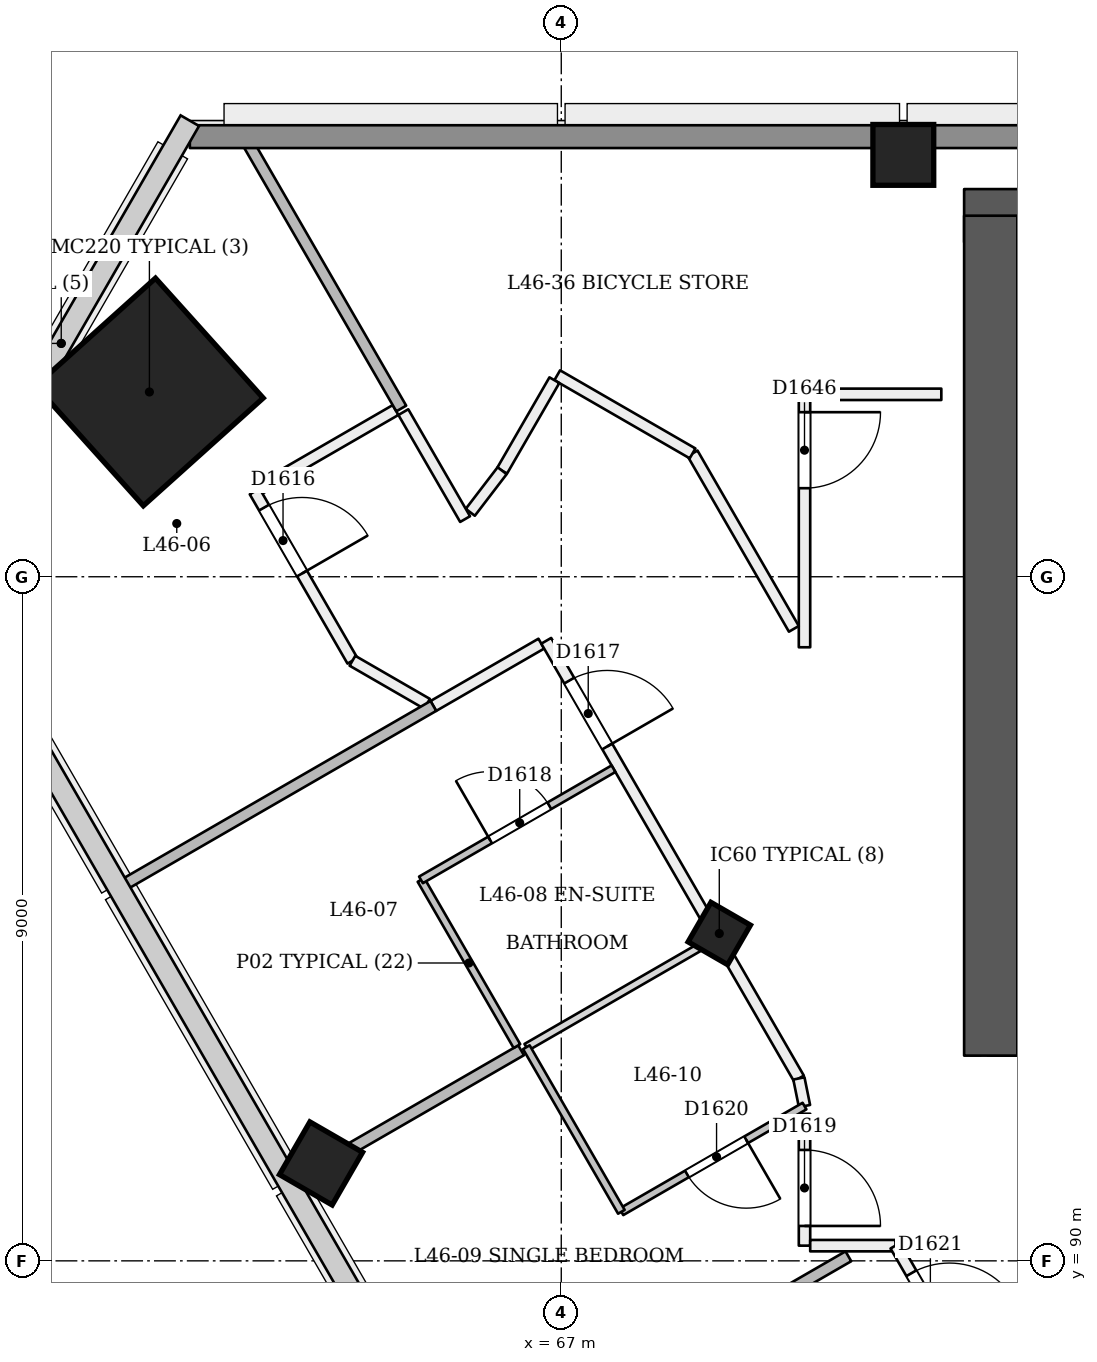
"""IFC4 building model, lengths in metres.
Left out: names, types, materials, properties, quantities, classifications, styles, units other than length and angle.
Written with IfcOpenShell. Run it as: python <this file> out.ifc"""

import sys

from ifc_helpers import new_model, si_unit, direction, frame, frame_2d, origin, origin_2d, place, context, subcontext, project, spatial, rectangle, extrude, element, fill, save


model = new_model("IFC4")
c1 = context("Model", 3, precision=1e-05, world=origin(), true_north=direction((0.0, 1.0)))
c2 = subcontext(c1, "Body", "Model", "MODEL_VIEW")
j1 = project(units=[si_unit("LENGTHUNIT", "METRE"), si_unit("PLANEANGLEUNIT", "RADIAN")], contexts=[c1])
p1 = place(None, origin())
s1 = spatial("IfcSite", under=j1, at=p1, CompositionType="ELEMENT")
p2 = place(p1, origin())
s2 = spatial("IfcBuilding", under=s1, at=p2, CompositionType="ELEMENT")
p3 = place(p2, frame((0.0, 0.0, 178.2)))
s3 = spatial("IfcBuildingStorey", under=s2, at=p3, CompositionType="ELEMENT", Elevation=178.2)
p4 = place(p3, frame((72.65, 93.05, 0.0), z_axis=(0.0, 0.0, 1.0), x_axis=(1.0, 0.0, 0.0)))
e1 = element("IfcWall", 1, at=p4, inside=s3, PredefinedType="SHEAR", context=c2, shape_type="SweptSolid", body=[
    extrude(rectangle(XDim=25.05, YDim=0.7, at=frame_2d((12.525, 0.0))), origin(), (0.0, 0.0, 1.0), 3.6),
])
p5 = place(p4, frame((1.15, 0.0, 0.0)))
e2 = element("IfcOpeningElement", 2, at=p5, cuts=e1, PredefinedType="OPENING", context=c2, shape_type="SweptSolid", body=[
    extrude(rectangle(XDim=1.2, YDim=2.1, at=frame_2d((0.6, 1.05))), frame((0.0, 0.36, 0.0), z_axis=(0.0, -1.0, 0.0), x_axis=(1.0, 0.0, 0.0)), (0.0, 0.0, 1.0), 0.721),
])
p6 = place(p4, frame((3.35, 0.0, 0.0)))
e3 = element("IfcOpeningElement", 3, at=p6, cuts=e1, PredefinedType="OPENING", context=c2, shape_type="SweptSolid", body=[
    extrude(rectangle(XDim=1.2, YDim=2.1, at=frame_2d((0.6, 1.05))), frame((0.0, 0.36, 0.0), z_axis=(0.0, -1.0, 0.0), x_axis=(1.0, 0.0, 0.0)), (0.0, 0.0, 1.0), 0.721),
])
p7 = place(p4, frame((13.35, 0.0, 0.0)))
e4 = element("IfcOpeningElement", 4, at=p7, cuts=e1, PredefinedType="OPENING", context=c2, shape_type="SweptSolid", body=[
    extrude(rectangle(XDim=1.2, YDim=2.1, at=frame_2d((0.6, 1.05))), frame((0.0, 0.36, 0.0), z_axis=(0.0, -1.0, 0.0), x_axis=(1.0, 0.0, 0.0)), (0.0, 0.0, 1.0), 0.721),
])
p8 = place(p4, frame((15.312, 0.0, 0.0)))
e5 = element("IfcOpeningElement", 5, at=p8, cuts=e1, PredefinedType="OPENING", context=c2, shape_type="SweptSolid", body=[
    extrude(rectangle(XDim=1.0, YDim=2.1, at=frame_2d((0.5, 1.05))), frame((0.0, 0.36, 0.0), z_axis=(0.0, -1.0, 0.0), x_axis=(1.0, 0.0, 0.0)), (0.0, 0.0, 1.0), 0.721),
])
p9 = place(p4, frame((18.15, 0.0, 0.0)))
e6 = element("IfcOpeningElement", 6, at=p9, cuts=e1, PredefinedType="OPENING", context=c2, shape_type="SweptSolid", body=[
    extrude(rectangle(XDim=1.0, YDim=2.1, at=frame_2d((0.5, 1.05))), frame((0.0, 0.36, 0.0), z_axis=(0.0, -1.0, 0.0), x_axis=(1.0, 0.0, 0.0)), (0.0, 0.0, 1.0), 0.721),
])
p10 = place(p4, frame((21.05, 0.0, 0.0)))
e7 = element("IfcOpeningElement", 7, at=p10, cuts=e1, PredefinedType="OPENING", context=c2, shape_type="SweptSolid", body=[
    extrude(rectangle(XDim=1.0, YDim=2.1, at=frame_2d((0.5, 1.05))), frame((0.0, 0.36, 0.0), z_axis=(0.0, -1.0, 0.0), x_axis=(1.0, 0.0, 0.0)), (0.0, 0.0, 1.0), 0.721),
])
p11 = place(p4, frame((22.938, 0.0, 0.0)))
e8 = element("IfcOpeningElement", 8, at=p11, cuts=e1, PredefinedType="OPENING", context=c2, shape_type="SweptSolid", body=[
    extrude(rectangle(XDim=1.0, YDim=2.1, at=frame_2d((0.5, 1.05))), frame((0.0, 0.36, 0.0), z_axis=(0.0, -1.0, 0.0), x_axis=(1.0, 0.0, 0.0)), (0.0, 0.0, 1.0), 0.721),
])
p12 = place(p3, frame((97.35, 103.75, 0.0), z_axis=(0.0, 0.0, 1.0), x_axis=(-1.0, 0.0, 0.0)))
e9 = element("IfcWall", 9, at=p12, inside=s3, PredefinedType="SHEAR", context=c2, shape_type="SweptSolid", body=[
    extrude(rectangle(XDim=25.05, YDim=0.7, at=frame_2d((12.525, 0.0))), origin(), (0.0, 0.0, 1.0), 3.6),
])
p13 = place(p3, frame((72.65, 103.75, 0.0), z_axis=(0.0, 0.0, 1.0), x_axis=(0.0, -1.0, 0.0)))
e10 = element("IfcWall", 10, at=p13, inside=s3, PredefinedType="SHEAR", context=c2, shape_type="SweptSolid", body=[
    extrude(rectangle(XDim=11.05, YDim=0.7, at=frame_2d((5.525, 0.0))), origin(), (0.0, 0.0, 1.0), 3.6),
])
p14 = place(p3, frame((69.052, 94.26, -0.018), z_axis=(0.022222852987, 0.038483477124, 0.999012095419), x_axis=(-0.865642058299, -0.49918203825, 0.038485316572)))
e11 = element("IfcColumn", 11, at=p14, inside=s3, PredefinedType="COLUMN", context=c2, shape_type="SweptSolid", body=[
    extrude(rectangle(XDim=0.6, YDim=0.6, at=origin_2d()), origin(), (0.0, 0.0, 1.0), 3.604),
])
p15 = place(p3, frame((61.547, 101.42, 0.0), z_axis=(0.028401796786, 0.009286506348, 0.999553449666), x_axis=(-0.866206321778, 0.499287135176, 0.019974102218)))
e12 = element("IfcColumn", 12, at=p15, inside=s3, PredefinedType="COLUMN", context=c2, shape_type="SweptSolid", body=[
    extrude(rectangle(XDim=2.12, YDim=2.12, at=origin_2d()), origin(), (0.0, 0.0, 1.0), 3.602),
])
p16 = place(p3, frame((71.5, 104.55, 0.0), z_axis=(0.0, 0.0, 1.0), x_axis=(1.0, 0.0, 0.0)))
e13 = element("IfcColumn", 13, at=p16, inside=s3, PredefinedType="COLUMN", context=c2, shape_type="SweptSolid", body=[
    extrude(rectangle(XDim=0.8, YDim=0.8, at=origin_2d()), origin(), (0.0, 0.0, 1.0), 3.6),
])
p17 = place(p3, frame((63.812, 91.234, -0.024), z_axis=(0.02215519141, 0.038415882353, 0.999016199807), x_axis=(-0.865361947816, -0.499673614488, 0.038405445666)))
e14 = element("IfcColumn", 14, at=p17, inside=s3, PredefinedType="COLUMN", context=c2, shape_type="SweptSolid", body=[
    extrude(rectangle(XDim=0.8, YDim=0.8, at=origin_2d()), origin(), (0.0, 0.0, 1.0), 3.604),
])
p18 = place(p3, frame((64.82, 101.193, 0.0), z_axis=(0.0, 0.0, 1.0), x_axis=(-0.865774039155, -0.500435123793, 0.0)))
e15 = element("IfcWall", 15, at=p18, inside=s3, PredefinedType="PARTITIONING", context=c2, shape_type="SweptSolid", body=[
    extrude(rectangle(XDim=2.066, YDim=0.15, at=frame_2d((1.033, 0.0))), origin(), (0.0, 0.0, 1.0), 3.15),
])
p19 = place(p3, frame((62.967, 100.122, 0.0), z_axis=(0.0, 0.0, 1.0), x_axis=(0.499988145349, -0.866032247962, 0.0)))
e16 = element("IfcWall", 16, at=p19, inside=s3, PredefinedType="PARTITIONING", context=c2, shape_type="SweptSolid", body=[
    extrude(rectangle(XDim=2.572, YDim=0.15, at=frame_2d((1.286, 0.0))), origin(), (0.0, 0.0, 1.0), 3.15),
])
p20 = place(p19, frame((0.246, 0.0, 0.0)))
e17 = element("IfcOpeningElement", 17, at=p20, cuts=e16, PredefinedType="OPENING", context=c2, shape_type="SweptSolid", body=[
    extrude(rectangle(XDim=1.0, YDim=2.1, at=frame_2d((0.5, 1.05))), frame((0.0, 0.085, 0.0), z_axis=(0.0, -1.0, 0.0), x_axis=(1.0, 0.0, 0.0)), (0.0, 0.0, 1.0), 0.171),
])
p21 = place(p3, frame((64.252, 97.895, 0.0), z_axis=(0.0, 0.0, 1.0), x_axis=(0.865966686804, -0.500101687005, 0.0)))
e18 = element("IfcWall", 18, at=p21, inside=s3, PredefinedType="PARTITIONING", context=c2, shape_type="SweptSolid", body=[
    extrude(rectangle(XDim=1.133, YDim=0.15, at=frame_2d((0.566, 0.0))), origin(), (0.0, 0.0, 1.0), 3.15),
])
p22 = place(p3, frame((65.317, 97.3, 0.0), z_axis=(0.0, 0.0, 1.0), x_axis=(0.866016967894, 0.500014611105, 0.0)))
e19 = element("IfcWall", 19, at=p22, inside=s3, PredefinedType="PARTITIONING", context=c2, shape_type="SweptSolid", body=[
    extrude(rectangle(XDim=1.64, YDim=0.15, at=frame_2d((0.82, 0.0))), origin(), (0.0, 0.0, 1.0), 3.15),
])
p23 = place(p3, frame((66.802, 98.157, 0.0), z_axis=(0.0, 0.0, 1.0), x_axis=(0.499982058975, -0.866035761792, 0.0)))
e20 = element("IfcWall", 20, at=p23, inside=s3, PredefinedType="PARTITIONING", context=c2, shape_type="SweptSolid", body=[
    extrude(rectangle(XDim=6.648, YDim=0.15, at=frame_2d((3.324, 0.0))), origin(), (0.0, 0.0, 1.0), 2.75),
])
p24 = place(p23, frame((0.605, 0.0, 0.0)))
e21 = element("IfcOpeningElement", 21, at=p24, cuts=e20, PredefinedType="OPENING", context=c2, shape_type="SweptSolid", body=[
    extrude(rectangle(XDim=1.0, YDim=2.1, at=frame_2d((0.5, 1.05))), frame((0.0, 0.085, 0.0), z_axis=(0.0, -1.0, 0.0), x_axis=(1.0, 0.0, 0.0)), (0.0, 0.0, 1.0), 0.171),
])
p25 = place(p3, frame((70.2, 91.935, 0.0), z_axis=(0.0, 0.0, 1.0), x_axis=(0.0, -1.0, 0.0)))
e22 = element("IfcWall", 22, at=p25, inside=s3, PredefinedType="PARTITIONING", context=c2, shape_type="SweptSolid", body=[
    extrude(rectangle(XDim=1.735, YDim=0.15, at=frame_2d((0.868, 0.0))), origin(), (0.0, 0.0, 1.0), 3.15),
])
p26 = place(p25, frame((0.476, 0.0, 0.0)))
e23 = element("IfcOpeningElement", 23, at=p26, cuts=e22, PredefinedType="OPENING", context=c2, shape_type="SweptSolid", body=[
    extrude(rectangle(XDim=1.0, YDim=2.1, at=frame_2d((0.5, 1.05))), frame((0.0, 0.085, 0.0), z_axis=(0.0, -1.0, 0.0), x_axis=(1.0, 0.0, 0.0)), (0.0, 0.0, 1.0), 0.171),
])
p27 = place(p3, frame((70.275, 90.2, 0.0), z_axis=(0.0, 0.0, 1.0), x_axis=(1.0, 0.0, 0.0)))
e24 = element("IfcWall", 24, at=p27, inside=s3, PredefinedType="PARTITIONING", context=c2, shape_type="SweptSolid", body=[
    extrude(rectangle(XDim=1.122, YDim=0.15, at=frame_2d((0.561, 0.0))), origin(), (0.0, 0.0, 1.0), 3.15),
])
p28 = place(p3, frame((70.126, 92.4, 0.0), z_axis=(0.0, 0.0, 1.0), x_axis=(0.198645351923, -0.980071438294, 0.0)))
e25 = element("IfcWall", 25, at=p28, inside=s3, PredefinedType="PARTITIONING", context=c2, shape_type="SweptSolid", body=[
    extrude(rectangle(XDim=0.371, YDim=0.15, at=frame_2d((0.186, 0.0))), origin(), (0.0, 0.0, 1.0), 3.15),
])
p29 = place(p3, frame((71.396, 90.2, 0.0), z_axis=(0.0, 0.0, 1.0), x_axis=(0.500000568002, -0.866025075848, 0.0)))
e26 = element("IfcWall", 26, at=p29, inside=s3, PredefinedType="PARTITIONING", context=c2, shape_type="SweptSolid", body=[
    extrude(rectangle(XDim=27.077, YDim=0.15, at=frame_2d((13.539, 0.0))), origin(), (0.0, 0.0, 1.0), 2.75),
])
p30 = place(p29, frame((0.419, 0.0, 0.0)))
e27 = element("IfcOpeningElement", 27, at=p30, cuts=e26, PredefinedType="OPENING", context=c2, shape_type="SweptSolid", body=[
    extrude(rectangle(XDim=1.0, YDim=2.1, at=frame_2d((0.5, 1.05))), frame((0.0, 0.085, 0.0), z_axis=(0.0, -1.0, 0.0), x_axis=(1.0, 0.0, 0.0)), (0.0, 0.0, 1.0), 0.171),
])
p31 = place(p29, frame((7.091, 0.0, 0.0)))
e28 = element("IfcOpeningElement", 28, at=p31, cuts=e26, PredefinedType="OPENING", context=c2, shape_type="SweptSolid", body=[
    extrude(rectangle(XDim=1.0, YDim=2.1, at=frame_2d((0.5, 1.05))), frame((0.0, 0.085, 0.0), z_axis=(0.0, -1.0, 0.0), x_axis=(1.0, 0.0, 0.0)), (0.0, 0.0, 1.0), 0.171),
])
p32 = place(p29, frame((9.532, 0.0, 0.0)))
e29 = element("IfcOpeningElement", 29, at=p32, cuts=e26, PredefinedType="OPENING", context=c2, shape_type="SweptSolid", body=[
    extrude(rectangle(XDim=1.0, YDim=2.1, at=frame_2d((0.5, 1.05))), frame((0.0, 0.085, 0.0), z_axis=(0.0, -1.0, 0.0), x_axis=(1.0, 0.0, 0.0)), (0.0, 0.0, 1.0), 0.171),
])
p33 = place(p29, frame((16.091, 0.0, 0.0)))
e30 = element("IfcOpeningElement", 30, at=p33, cuts=e26, PredefinedType="OPENING", context=c2, shape_type="SweptSolid", body=[
    extrude(rectangle(XDim=1.0, YDim=2.1, at=frame_2d((0.5, 1.05))), frame((0.0, 0.085, 0.0), z_axis=(0.0, -1.0, 0.0), x_axis=(1.0, 0.0, 0.0)), (0.0, 0.0, 1.0), 0.171),
])
p34 = place(p29, frame((18.416, 0.0, 0.0)))
e31 = element("IfcOpeningElement", 31, at=p34, cuts=e26, PredefinedType="OPENING", context=c2, shape_type="SweptSolid", body=[
    extrude(rectangle(XDim=1.0, YDim=2.1, at=frame_2d((0.5, 1.05))), frame((0.0, 0.085, 0.0), z_axis=(0.0, -1.0, 0.0), x_axis=(1.0, 0.0, 0.0)), (0.0, 0.0, 1.0), 0.171),
])
p35 = place(p29, frame((25.432, 0.0, 0.0)))
e32 = element("IfcOpeningElement", 32, at=p35, cuts=e26, PredefinedType="OPENING", context=c2, shape_type="SweptSolid", body=[
    extrude(rectangle(XDim=1.2, YDim=2.1, at=frame_2d((0.6, 1.05))), frame((0.0, 0.085, 0.0), z_axis=(0.0, -1.0, 0.0), x_axis=(1.0, 0.0, 0.0)), (0.0, 0.0, 1.0), 0.171),
])
p36 = place(p3, frame((72.0, 101.4, 0.0), z_axis=(0.0, 0.0, 1.0), x_axis=(-1.0, 0.0, 0.0)))
e33 = element("IfcWall", 33, at=p36, inside=s3, PredefinedType="PARTITIONING", context=c2, shape_type="SweptSolid", body=[
    extrude(rectangle(XDim=1.725, YDim=0.15, at=frame_2d((0.863, 0.0))), origin(), (0.0, 0.0, 1.0), 3.15),
])
p37 = place(p3, frame((70.2, 101.4, 0.0), z_axis=(0.0, 0.0, 1.0), x_axis=(0.0, -1.0, 0.0)))
e34 = element("IfcWall", 34, at=p37, inside=s3, PredefinedType="PARTITIONING", context=c2, shape_type="SweptSolid", body=[
    extrude(rectangle(XDim=3.328, YDim=0.15, at=frame_2d((1.664, 0.0))), origin(), (0.0, 0.0, 1.0), 3.15),
])
p38 = place(p37, frame((0.235, 0.0, 0.0)))
e35 = element("IfcOpeningElement", 35, at=p38, cuts=e34, PredefinedType="OPENING", context=c2, shape_type="SweptSolid", body=[
    extrude(rectangle(XDim=1.0, YDim=2.1, at=frame_2d((0.5, 1.05))), frame((0.0, 0.085, 0.0), z_axis=(0.0, -1.0, 0.0), x_axis=(1.0, 0.0, 0.0)), (0.0, 0.0, 1.0), 0.171),
])
p39 = place(p3, frame((70.06, 98.315, 0.0), z_axis=(0.0, 0.0, 1.0), x_axis=(-0.500010524421, 0.866019327422, 0.0)))
e36 = element("IfcWall", 36, at=p39, inside=s3, PredefinedType="PARTITIONING", context=c2, shape_type="SweptSolid", body=[
    extrude(rectangle(XDim=2.666, YDim=0.15, at=frame_2d((1.333, 0.0))), origin(), (0.0, 0.0, 1.0), 3.15),
])
p40 = place(p3, frame((68.727, 100.623, 0.0), z_axis=(0.0, 0.0, 1.0), x_axis=(-0.866027366358, 0.499996600708, 0.0)))
e37 = element("IfcWall", 37, at=p40, inside=s3, PredefinedType="PARTITIONING", context=c2, shape_type="SweptSolid", body=[
    extrude(rectangle(XDim=2.056, YDim=0.15, at=frame_2d((1.028, 0.0))), origin(), (0.0, 0.0, 1.0), 3.15),
])
p41 = place(p3, frame((66.909, 101.586, 0.0), z_axis=(0.0, 0.0, 1.0), x_axis=(-0.499958106649, -0.866049589571, 0.0)))
e38 = element("IfcWall", 38, at=p41, inside=s3, PredefinedType="PARTITIONING", context=c2, shape_type="SweptSolid", body=[
    extrude(rectangle(XDim=1.375, YDim=0.15, at=frame_2d((0.688, 0.0))), origin(), (0.0, 0.0, 1.0), 3.15),
])
p42 = place(p3, frame((66.222, 100.395, 0.0), z_axis=(0.0, 0.0, 1.0), x_axis=(-0.607962851569, -0.793965472242, 0.0)))
e39 = element("IfcWall", 39, at=p42, inside=s3, PredefinedType="PARTITIONING", context=c2, shape_type="SweptSolid", body=[
    extrude(rectangle(XDim=0.689, YDim=0.15, at=frame_2d((0.345, 0.0))), origin(), (0.0, 0.0, 1.0), 3.15),
])
p43 = place(p3, frame((65.735, 99.759, 0.0), z_axis=(0.0, 0.0, 1.0), x_axis=(-0.499839503961, 0.866118046389, 0.0)))
e40 = element("IfcWall", 40, at=p43, inside=s3, PredefinedType="PARTITIONING", context=c2, shape_type="SweptSolid", body=[
    extrude(rectangle(XDim=1.625, YDim=0.15, at=frame_2d((0.812, 0.0))), origin(), (0.0, 0.0, 1.0), 3.15),
])
p44 = place(p3, frame((61.242, 94.947, 0.0), z_axis=(0.0, 0.0, 1.0), x_axis=(0.866028339916, 0.499994914436, 0.0)))
e41 = element("IfcWall", 41, at=p44, inside=s3, PredefinedType="PARTITIONING", context=c2, shape_type="SweptSolid", body=[
    extrude(rectangle(XDim=4.706, YDim=0.15, at=frame_2d((2.353, 0.0))), origin(), (0.0, 0.0, 1.0), 2.65),
])
p45 = place(p3, frame((64.895, 101.214, 0.0), z_axis=(0.0, 0.0, 1.0), x_axis=(-0.500025305846, 0.866010792954, 0.0)))
e42 = element("IfcWall", 42, at=p45, inside=s3, PredefinedType="PARTITIONING", context=c2, shape_type="SweptSolid", body=[
    extrude(rectangle(XDim=4.257, YDim=0.15, at=frame_2d((2.128, 0.0))), origin(), (0.0, 0.0, 1.0), 2.65),
])
p46 = place(p3, frame((66.417, 92.825, 0.0), z_axis=(0.0, 0.0, 1.0), x_axis=(-0.499976333282, 0.866039067339, 0.0)))
e43 = element("IfcWall", 43, at=p46, inside=s3, PredefinedType="PARTITIONING", context=c2, shape_type="SweptSolid", body=[
    extrude(rectangle(XDim=2.525, YDim=0.1, at=frame_2d((1.262, 0.0))), origin(), (0.0, 0.0, 1.0), 2.75),
])
p47 = place(p3, frame((65.154, 95.012, 0.0), z_axis=(0.0, 0.0, 1.0), x_axis=(0.866046596414, 0.499963291492, 0.0)))
e44 = element("IfcWall", 44, at=p47, inside=s3, PredefinedType="PARTITIONING", context=c2, shape_type="SweptSolid", body=[
    extrude(rectangle(XDim=2.925, YDim=0.1, at=frame_2d((1.462, 0.0))), origin(), (0.0, 0.0, 1.0), 3.15),
])
p48 = place(p47, frame((1.05, 0.0, 0.0)))
e45 = element("IfcOpeningElement", 45, at=p48, cuts=e44, PredefinedType="OPENING", context=c2, shape_type="SweptSolid", body=[
    extrude(rectangle(XDim=0.9, YDim=2.1, at=frame_2d((0.45, 1.05))), frame((0.0, 0.061, 0.0), z_axis=(0.0, -1.0, 0.0), x_axis=(1.0, 0.0, 0.0)), (0.0, 0.0, 1.0), 0.121),
])
p49 = place(p3, frame((63.51, 91.06, 0.0), z_axis=(0.0, 0.0, 1.0), x_axis=(0.866038183914, 0.499977863513, 0.0)))
e46 = element("IfcWall", 46, at=p49, inside=s3, PredefinedType="PARTITIONING", context=c2, shape_type="SweptSolid", body=[
    extrude(rectangle(XDim=3.42, YDim=0.15, at=frame_2d((1.71, 0.0))), origin(), (0.0, 0.0, 1.0), 2.65),
])
p50 = place(p3, frame((66.541, 92.81, 0.0), z_axis=(0.0, 0.0, 1.0), x_axis=(0.866011447264, 0.500024172624, 0.0)))
e47 = element("IfcWall", 47, at=p50, inside=s3, PredefinedType="PARTITIONING", context=c2, shape_type="SweptSolid", body=[
    extrude(rectangle(XDim=2.825, YDim=0.1, at=frame_2d((1.413, 0.0))), origin(), (0.0, 0.0, 1.0), 2.75),
])
p51 = place(p3, frame((70.2, 92.036, 0.0), z_axis=(0.0, 0.0, 1.0), x_axis=(-0.866036517529, -0.499980749935, 0.0)))
e48 = element("IfcWall", 48, at=p51, inside=s3, PredefinedType="PARTITIONING", context=c2, shape_type="SweptSolid", body=[
    extrude(rectangle(XDim=2.782, YDim=0.1, at=frame_2d((1.391, 0.0))), origin(), (0.0, 0.0, 1.0), 3.15),
])
p52 = place(p51, frame((0.886, 0.0, 0.0)))
e49 = element("IfcOpeningElement", 49, at=p52, cuts=e48, PredefinedType="OPENING", context=c2, shape_type="SweptSolid", body=[
    extrude(rectangle(XDim=0.9, YDim=2.1, at=frame_2d((0.45, 1.05))), frame((0.0, 0.061, 0.0), z_axis=(0.0, -1.0, 0.0), x_axis=(1.0, 0.0, 0.0)), (0.0, 0.0, 1.0), 0.121),
])
p53 = place(p3, frame((67.791, 90.645, 0.0), z_axis=(0.0, 0.0, 1.0), x_axis=(-0.500004234368, 0.866022959057, 0.0)))
e50 = element("IfcWall", 50, at=p53, inside=s3, PredefinedType="PARTITIONING", context=c2, shape_type="SweptSolid", body=[
    extrude(rectangle(XDim=2.5, YDim=0.1, at=frame_2d((1.25, 0.0))), origin(), (0.0, 0.0, 1.0), 2.75),
])
p54 = place(p3, frame((65.742, 87.153, 0.0), z_axis=(0.0, 0.0, 1.0), x_axis=(0.866019850528, 0.500009618399, 0.0)))
e51 = element("IfcWall", 51, at=p54, inside=s3, PredefinedType="PARTITIONING", context=c2, shape_type="SweptSolid", body=[
    extrude(rectangle(XDim=5.814, YDim=0.15, at=frame_2d((2.907, 0.0))), origin(), (0.0, 0.0, 1.0), 2.65),
])
p55 = place(p3, frame((62.113, 104.79, 0.0), z_axis=(0.0, 0.0, 1.0), x_axis=(1.0, 0.0, 0.0)))
e52 = element("IfcWall", 52, at=p55, inside=s3, PredefinedType="SOLIDWALL", context=c2, shape_type="SweptSolid", body=[
    extrude(rectangle(XDim=45.773, YDim=0.3, at=frame_2d((22.887, 0.0))), origin(), (0.0, 0.0, 1.0), 2.65),
])
p56 = place(p20, origin())
e53 = element("IfcDoor", 53, at=p56, inside=s3, OperationType="SINGLE_SWING_RIGHT", PredefinedType="NOTDEFINED", context=c2, shape_type="SweptSolid", body=[
    extrude(rectangle(XDim=1.0, YDim=2.1, at=frame_2d((0.5, 1.05))), frame((0.0, 0.025, 0.0), z_axis=(0.0, -1.0, 0.0), x_axis=(1.0, 0.0, 0.0)), (0.0, 0.0, 1.0), 0.05),
])
fill(e17, e53)
p57 = place(p24, origin())
e54 = element("IfcDoor", 54, at=p57, inside=s3, OperationType="SINGLE_SWING_RIGHT", PredefinedType="NOTDEFINED", context=c2, shape_type="SweptSolid", body=[
    extrude(rectangle(XDim=1.0, YDim=2.1, at=frame_2d((0.5, 1.05))), frame((0.0, 0.025, 0.0), z_axis=(0.0, -1.0, 0.0), x_axis=(1.0, 0.0, 0.0)), (0.0, 0.0, 1.0), 0.05),
])
fill(e21, e54)
p58 = place(p48, origin())
e55 = element("IfcDoor", 55, at=p58, inside=s3, OperationType="SINGLE_SWING_LEFT", PredefinedType="NOTDEFINED", context=c2, shape_type="SweptSolid", body=[
    extrude(rectangle(XDim=0.9, YDim=2.1, at=frame_2d((0.45, 1.05))), frame((0.0, 0.025, 0.0), z_axis=(0.0, -1.0, 0.0), x_axis=(1.0, 0.0, 0.0)), (0.0, 0.0, 1.0), 0.05),
])
fill(e45, e55)
p59 = place(p26, origin())
e56 = element("IfcDoor", 56, at=p59, inside=s3, OperationType="SINGLE_SWING_RIGHT", PredefinedType="NOTDEFINED", context=c2, shape_type="SweptSolid", body=[
    extrude(rectangle(XDim=1.0, YDim=2.1, at=frame_2d((0.5, 1.05))), frame((0.0, 0.025, 0.0), z_axis=(0.0, -1.0, 0.0), x_axis=(1.0, 0.0, 0.0)), (0.0, 0.0, 1.0), 0.05),
])
fill(e23, e56)
p60 = place(p52, origin())
e57 = element("IfcDoor", 57, at=p60, inside=s3, OperationType="SINGLE_SWING_LEFT", PredefinedType="NOTDEFINED", context=c2, shape_type="SweptSolid", body=[
    extrude(rectangle(XDim=0.9, YDim=2.1, at=frame_2d((0.45, 1.05))), frame((0.0, 0.025, 0.0), z_axis=(0.0, -1.0, 0.0), x_axis=(1.0, 0.0, 0.0)), (0.0, 0.0, 1.0), 0.05),
])
fill(e49, e57)
p61 = place(p30, origin())
e58 = element("IfcDoor", 58, at=p61, inside=s3, OperationType="SINGLE_SWING_RIGHT", PredefinedType="NOTDEFINED", context=c2, shape_type="SweptSolid", body=[
    extrude(rectangle(XDim=1.0, YDim=2.1, at=frame_2d((0.5, 1.05))), frame((0.0, 0.025, 0.0), z_axis=(0.0, -1.0, 0.0), x_axis=(1.0, 0.0, 0.0)), (0.0, 0.0, 1.0), 0.05),
])
fill(e27, e58)
p62 = place(p38, origin())
e59 = element("IfcDoor", 59, at=p62, inside=s3, OperationType="SINGLE_SWING_LEFT", PredefinedType="NOTDEFINED", context=c2, shape_type="SweptSolid", body=[
    extrude(rectangle(XDim=1.0, YDim=2.1, at=frame_2d((0.5, 1.05))), frame((0.0, 0.025, 0.0), z_axis=(0.0, -1.0, 0.0), x_axis=(1.0, 0.0, 0.0)), (0.0, 0.0, 1.0), 0.05),
])
fill(e35, e59)
save(model, sys.argv[1])
